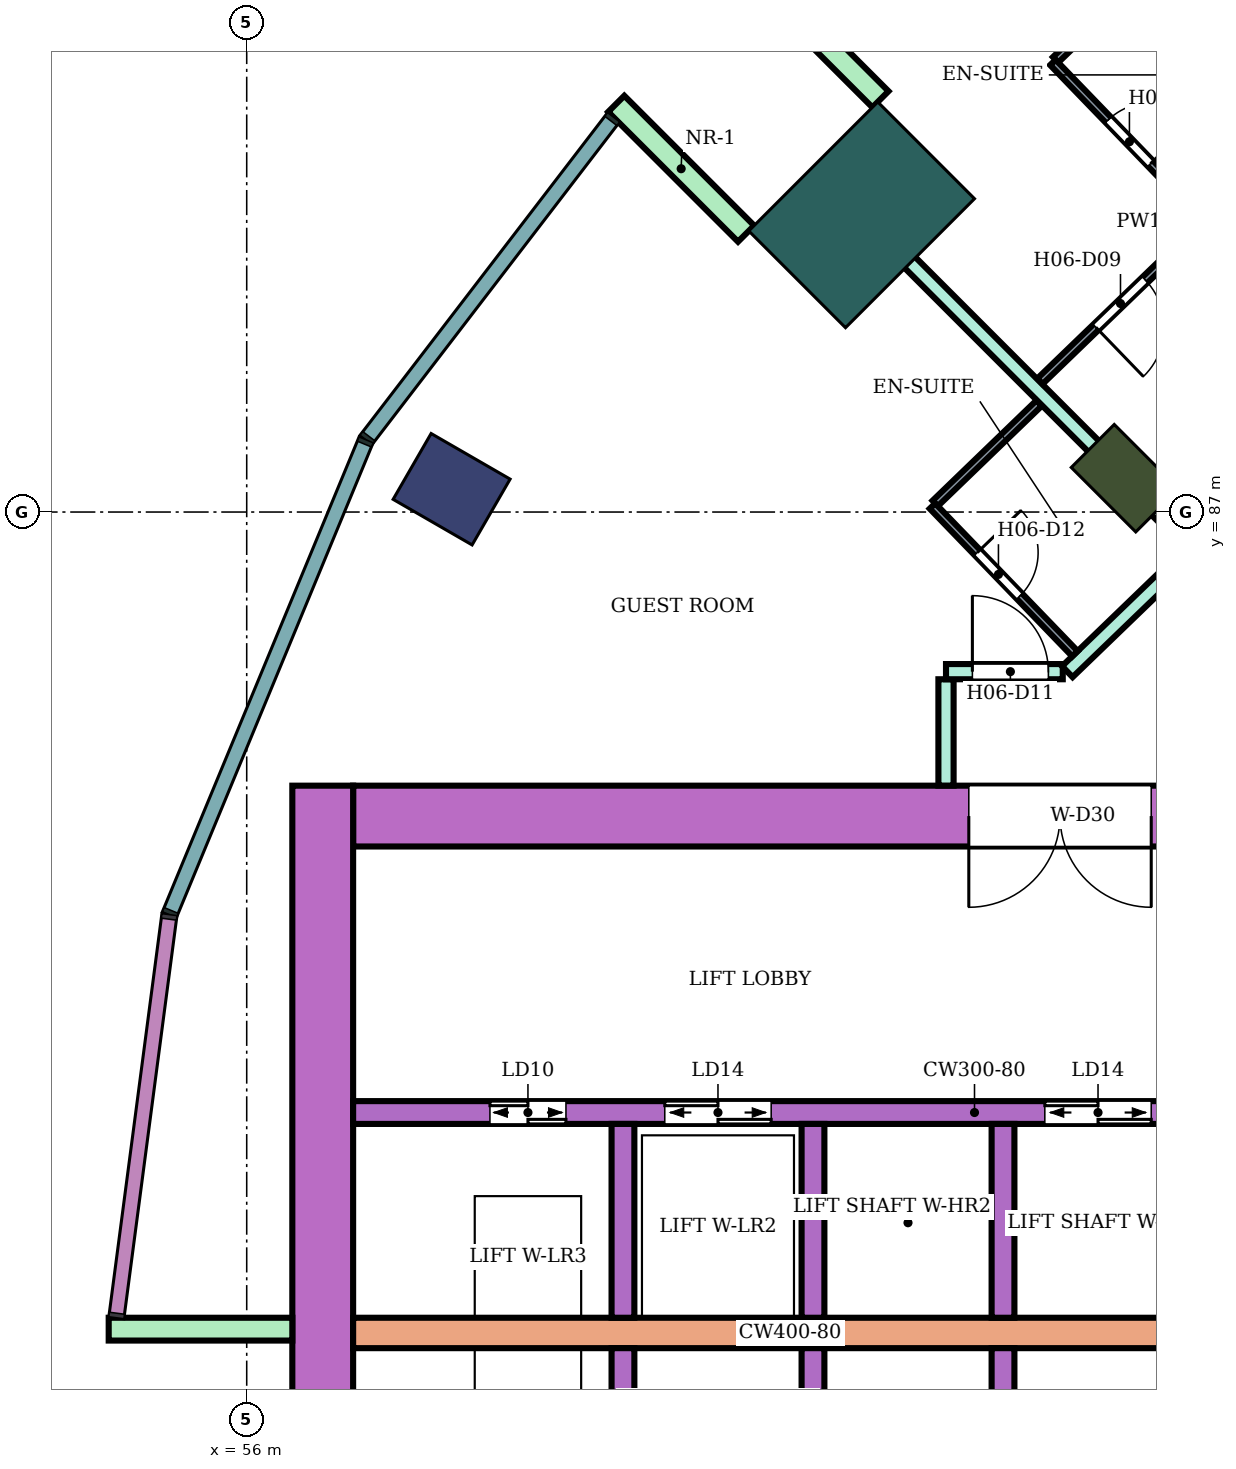
"""IFC4 building model, lengths in metres.
Left out: names, types, materials, properties, quantities, classifications, styles, units other than length and angle.
Written with IfcOpenShell. Run it as: python <this file> out.ifc"""

import sys

from ifc_helpers import new_model, si_unit, direction, frame, frame_2d, origin, origin_2d, place, context, subcontext, project, spatial, rectangle, extrude, element, fill, save


model = new_model("IFC4")
c1 = context("Model", 3, precision=1e-05, world=origin(), true_north=direction((0.0, 1.0)))
c2 = subcontext(c1, "Body", "Model", "MODEL_VIEW")
j1 = project(units=[si_unit("LENGTHUNIT", "METRE"), si_unit("PLANEANGLEUNIT", "RADIAN")], contexts=[c1])
p1 = place(None, origin())
s1 = spatial("IfcSite", under=j1, at=p1, CompositionType="ELEMENT")
p2 = place(p1, origin())
s2 = spatial("IfcBuilding", under=s1, at=p2, CompositionType="ELEMENT")
p3 = place(p2, frame((0.0, 0.0, 93.8)))
s3 = spatial("IfcBuildingStorey", under=s2, at=p3, CompositionType="ELEMENT", Elevation=93.8)
p4 = place(p3, frame((58.696, 87.3, 0.0), z_axis=(0.0, 0.0, 1.0), x_axis=(-0.866025403784, 0.5, 0.0)))
e1 = element("IfcColumn", 1, at=p4, inside=s3, PredefinedType="COLUMN", context=c2, shape_type="SweptSolid", body=[
    extrude(rectangle(XDim=1.2, YDim=1.0, at=origin_2d()), origin(), (0.0, 0.0, 1.0), 3.8),
])
p5 = place(p3, frame((67.555, 87.445, 0.0), z_axis=(0.0, 0.0, 1.0), x_axis=(-0.707106781187, 0.707106781187, 0.0)))
e2 = element("IfcColumn", 2, at=p5, inside=s3, PredefinedType="COLUMN", context=c2, shape_type="SweptSolid", body=[
    extrude(rectangle(XDim=1.2, YDim=0.8, at=origin_2d()), origin(), (0.0, 0.0, 1.0), 3.8),
])
p6 = place(p3, frame((64.09, 90.91, 0.0), z_axis=(0.0, 0.0, 1.0), x_axis=(-0.707106781187, 0.707106781187, 0.0)))
e3 = element("IfcColumn", 3, at=p6, inside=s3, PredefinedType="COLUMN", context=c2, shape_type="SweptSolid", body=[
    extrude(rectangle(XDim=1.8, YDim=2.4, at=origin_2d()), origin(), (0.0, 0.0, 1.0), 3.8),
])
p7 = place(p3, frame((72.1, 83.0, 0.0), z_axis=(0.0, 0.0, 1.0), x_axis=(-1.0, 0.0, 0.0)))
e4 = element("IfcWall", 4, at=p7, inside=s3, PredefinedType="SHEAR", context=c2, shape_type="SweptSolid", body=[
    extrude(rectangle(XDim=14.7, YDim=0.8, at=frame_2d((7.35, 0.0))), origin(), (0.0, 0.0, 1.0), 3.48),
])
p8 = place(p7, frame((4.2, 0.0, 0.0)))
e5 = element("IfcOpeningElement", 5, at=p8, cuts=e4, PredefinedType="OPENING", context=c2, shape_type="SweptSolid", body=[
    extrude(rectangle(XDim=2.4, YDim=2.4, at=frame_2d((1.2, 1.2))), frame((0.0, 0.41, 0.0), z_axis=(0.0, -1.0, 0.0), x_axis=(1.0, 0.0, 0.0)), (0.0, 0.0, 1.0), 0.82),
])
p9 = place(p3, frame((57.0, 83.4, 0.0), z_axis=(0.0, 0.0, 1.0), x_axis=(0.0, -1.0, 0.0)))
e6 = element("IfcWall", 6, at=p9, inside=s3, PredefinedType="SHEAR", context=c2, shape_type="SweptSolid", body=[
    extrude(rectangle(XDim=16.8, YDim=0.8, at=frame_2d((8.4, 0.0))), origin(), (0.0, 0.0, 1.0), 3.48),
])
p10 = place(p3, frame((68.3, 76.2, 0.0), z_axis=(0.0, 0.0, 1.0), x_axis=(-1.0, 0.0, 0.0)))
e7 = element("IfcWall", 7, at=p10, inside=s3, PredefinedType="SHEAR", context=c2, shape_type="SweptSolid", body=[
    extrude(rectangle(XDim=10.9, YDim=0.4, at=frame_2d((5.45, 0.0))), origin(), (0.0, 0.0, 1.0), 3.48),
])
p11 = place(p3, frame((68.3, 79.1, 0.0), z_axis=(0.0, 0.0, 1.0), x_axis=(-1.0, 0.0, 0.0)))
e8 = element("IfcWall", 8, at=p11, inside=s3, PredefinedType="SHEAR", context=c2, shape_type="SweptSolid", body=[
    extrude(rectangle(XDim=10.9, YDim=0.3, at=frame_2d((5.45, 0.0))), origin(), (0.0, 0.0, 1.0), 3.48),
])
p12 = place(p11, frame((0.4, 0.0, 0.0)))
e9 = element("IfcOpeningElement", 9, at=p12, cuts=e8, PredefinedType="OPENING", context=c2, shape_type="SweptSolid", body=[
    extrude(rectangle(XDim=1.4, YDim=2.1, at=frame_2d((0.7, 1.05))), frame((0.0, 0.16, 0.0), z_axis=(0.0, -1.0, 0.0), x_axis=(1.0, 0.0, 0.0)), (0.0, 0.0, 1.0), 0.32),
])
p13 = place(p11, frame((5.4, 0.0, 0.0)))
e10 = element("IfcOpeningElement", 10, at=p13, cuts=e8, PredefinedType="OPENING", context=c2, shape_type="SweptSolid", body=[
    extrude(rectangle(XDim=1.4, YDim=2.1, at=frame_2d((0.7, 1.05))), frame((0.0, 0.16, 0.0), z_axis=(0.0, -1.0, 0.0), x_axis=(1.0, 0.0, 0.0)), (0.0, 0.0, 1.0), 0.32),
])
p14 = place(p11, frame((8.1, 0.0, 0.0)))
e11 = element("IfcOpeningElement", 11, at=p14, cuts=e8, PredefinedType="OPENING", context=c2, shape_type="SweptSolid", body=[
    extrude(rectangle(XDim=1.0, YDim=2.1, at=frame_2d((0.5, 1.05))), frame((0.0, 0.16, 0.0), z_axis=(0.0, -1.0, 0.0), x_axis=(1.0, 0.0, 0.0)), (0.0, 0.0, 1.0), 0.32),
])
for number, where, z_axis, x_axis in (
    (12, (65.95, 76.0, 0.0), (0.0, 0.0, 1.0), (0.0, -1.0, 0.0)),
    (13, (63.45, 76.0, 0.0), (0.0, 0.0, 1.0), (0.0, -1.0, 0.0)),
    (14, (60.95, 76.0, 0.0), (0.0, 0.0, 1.0), (0.0, -1.0, 0.0)),
    (15, (65.95, 78.95, 0.0), (0.0, 0.0, 1.0), (0.0, -1.0, 0.0)),
    (16, (63.45, 78.95, 0.0), (0.0, 0.0, 1.0), (0.0, -1.0, 0.0)),
    (17, (60.95, 78.95, 0.0), (0.0, 0.0, 1.0), (0.0, -1.0, 0.0)),
):
    element("IfcWall", number, at=place(p3, frame(where, z_axis=z_axis, x_axis=x_axis)), inside=s3, PredefinedType="SHEAR", context=c2, shape_type="SweptSolid", body=[
        extrude(rectangle(XDim=2.55, YDim=0.3, at=frame_2d((1.275, 0.0))), origin(), (0.0, 0.0, 1.0), 3.48),
    ])
for number, where, z_axis, x_axis in (
    (18, (64.338, 92.43, 0.0), (0.0, 0.0, 1.0), (-0.707, 0.707, 0.0)),
    (19, (62.57, 90.662, 0.0), (0.0, 0.0, 1.0), (-0.707, 0.707, 0.0)),
    (20, (56.6, 76.25, 0.0), (0.0, 0.0, 1.0), (-1.0, 0.0, 0.0)),
):
    element("IfcWall", number, at=place(p3, frame(where, z_axis=z_axis, x_axis=x_axis)), inside=s3, PredefinedType="NOTDEFINED", context=c2, shape_type="SweptSolid", body=[
        extrude(rectangle(XDim=2.416, YDim=0.3, at=frame_2d((1.208, 0.0))), origin(), (0.0, 0.0, 1.0), 3.8),
    ])
p15 = place(p3, frame((63.6, 91.409, 0.0), z_axis=(0.0, 0.0, 1.0), x_axis=(0.706945318761, -0.707268206752, 0.0)))
e21 = element("IfcWall", 21, at=p15, inside=s3, PredefinedType="PARTITIONING", context=c2, shape_type="SweptSolid", body=[
    extrude(rectangle(XDim=6.805, YDim=0.2, at=frame_2d((3.402, 0.0))), origin(), (0.0, 0.0, 1.0), 3.35),
])
p16 = place(p3, frame((65.2, 83.401, 0.0), z_axis=(0.0, 0.0, 1.0), x_axis=(0.0, 1.0, 0.0)))
e22 = element("IfcWall", 22, at=p16, inside=s3, PredefinedType="PARTITIONING", context=c2, shape_type="SweptSolid", body=[
    extrude(rectangle(XDim=1.399, YDim=0.2, at=frame_2d((0.7, 0.0))), origin(), (0.0, 0.0, 1.0), 3.35),
])
p17 = place(p3, frame((65.2, 84.9, 0.0), z_axis=(0.0, 0.0, 1.0), x_axis=(1.0, 0.0, 0.0)))
e23 = element("IfcWall", 23, at=p17, inside=s3, PredefinedType="PARTITIONING", context=c2, shape_type="SweptSolid", body=[
    extrude(rectangle(XDim=1.536, YDim=0.2, at=frame_2d((0.768, 0.0))), origin(), (0.0, 0.0, 1.0), 3.35),
])
p18 = place(p17, frame((0.347, 0.0, 0.0)))
e24 = element("IfcOpeningElement", 24, at=p18, cuts=e23, PredefinedType="OPENING", context=c2, shape_type="SweptSolid", body=[
    extrude(rectangle(XDim=1.0, YDim=2.1, at=frame_2d((0.5, 1.05))), frame((0.0, 0.11, 0.0), z_axis=(0.0, -1.0, 0.0), x_axis=(1.0, 0.0, 0.0)), (0.0, 0.0, 1.0), 0.22),
])
p19 = place(p3, frame((66.796, 84.9, 0.0), z_axis=(0.0, 0.0, 1.0), x_axis=(0.719690784855, 0.694294731505, 0.0)))
e25 = element("IfcWall", 25, at=p19, inside=s3, PredefinedType="PARTITIONING", context=c2, shape_type="SweptSolid", body=[
    extrude(rectangle(XDim=6.585, YDim=0.2, at=frame_2d((3.292, 0.0))), origin(), (0.0, 0.0, 1.0), 3.35),
])
p20 = place(p19, frame((4.006, 0.0, 0.0)))
e26 = element("IfcOpeningElement", 26, at=p20, cuts=e25, PredefinedType="OPENING", context=c2, shape_type="SweptSolid", body=[
    extrude(rectangle(XDim=1.0, YDim=2.1, at=frame_2d((0.5, 1.05))), frame((0.0, 0.11, 0.0), z_axis=(0.0, -1.0, 0.0), x_axis=(1.0, 0.0, 0.0)), (0.0, 0.0, 1.0), 0.22),
])
p21 = place(p3, frame((67.102, 97.342, 0.0), z_axis=(0.0, 0.0, 1.0), x_axis=(0.499900389553, -0.866082906265, 0.0)))
e27 = element("IfcWall", 27, at=p21, inside=s3, PredefinedType="PARTITIONING", context=c2, shape_type="SweptSolid", body=[
    extrude(rectangle(XDim=8.908, YDim=0.2, at=frame_2d((4.454, 0.0))), origin(), (0.0, 0.0, 1.0), 3.35),
])
p22 = place(p3, frame((65.058, 87.114, 0.0), z_axis=(0.0, 0.0, 1.0), x_axis=(0.719653890619, 0.694332973232, 0.0)))
e28 = element("IfcWall", 28, at=p22, inside=s3, PredefinedType="PARTITIONING", context=c2, shape_type="SweptSolid", body=[
    extrude(rectangle(XDim=1.899, YDim=0.1, at=frame_2d((0.95, 0.0))), origin(), (0.0, 0.0, 1.0), 3.35),
])
p23 = place(p3, frame((65.022, 87.079, 0.0), z_axis=(0.0, 0.0, 1.0), x_axis=(0.694287838235, -0.719697434815, 0.0)))
e29 = element("IfcWall", 29, at=p23, inside=s3, PredefinedType="PARTITIONING", context=c2, shape_type="SweptSolid", body=[
    extrude(rectangle(XDim=2.7, YDim=0.1, at=frame_2d((1.35, 0.0))), origin(), (0.0, 0.0, 1.0), 3.35),
])
p24 = place(p23, frame((0.85, 0.0, 0.0)))
e30 = element("IfcOpeningElement", 30, at=p24, cuts=e29, PredefinedType="OPENING", context=c2, shape_type="SweptSolid", body=[
    extrude(rectangle(XDim=0.8, YDim=2.1, at=frame_2d((0.4, 1.05))), frame((0.0, 0.06, 0.0), z_axis=(0.0, -1.0, 0.0), x_axis=(1.0, 0.0, 0.0)), (0.0, 0.0, 1.0), 0.12),
])
p25 = place(p3, frame((66.436, 88.72, 0.0), z_axis=(0.0, 0.0, 1.0), x_axis=(0.719585934284, 0.694403400899, 0.0)))
e31 = element("IfcWall", 31, at=p25, inside=s3, PredefinedType="PARTITIONING", context=c2, shape_type="SweptSolid", body=[
    extrude(rectangle(XDim=4.925, YDim=0.1, at=frame_2d((2.462, 0.0))), origin(), (0.0, 0.0, 1.0), 3.35),
])
p26 = place(p25, frame((1.022, 0.0, 0.0)))
e32 = element("IfcOpeningElement", 32, at=p26, cuts=e31, PredefinedType="OPENING", context=c2, shape_type="SweptSolid", body=[
    extrude(rectangle(XDim=0.9, YDim=2.1, at=frame_2d((0.45, 1.05))), frame((0.0, 0.06, 0.0), z_axis=(0.0, -1.0, 0.0), x_axis=(1.0, 0.0, 0.0)), (0.0, 0.0, 1.0), 0.12),
])
p27 = place(p3, frame((66.642, 92.95, 0.0), z_axis=(0.0, 0.0, 1.0), x_axis=(0.719667412702, 0.694318957753, 0.0)))
e33 = element("IfcWall", 33, at=p27, inside=s3, PredefinedType="PARTITIONING", context=c2, shape_type="SweptSolid", body=[
    extrude(rectangle(XDim=2.562, YDim=0.1, at=frame_2d((1.281, 0.0))), origin(), (0.0, 0.0, 1.0), 3.35),
])
p28 = place(p3, frame((66.606, 92.915, 0.0), z_axis=(0.0, 0.0, 1.0), x_axis=(0.694403413121, -0.71958592249, 0.0)))
e34 = element("IfcWall", 34, at=p28, inside=s3, PredefinedType="PARTITIONING", context=c2, shape_type="SweptSolid", body=[
    extrude(rectangle(XDim=2.85, YDim=0.1, at=frame_2d((1.425, 0.0))), origin(), (0.0, 0.0, 1.0), 3.35),
])
p29 = place(p28, frame((1.05, 0.0, 0.0)))
e35 = element("IfcOpeningElement", 35, at=p29, cuts=e34, PredefinedType="OPENING", context=c2, shape_type="SweptSolid", body=[
    extrude(rectangle(XDim=0.8, YDim=2.1, at=frame_2d((0.4, 1.05))), frame((0.0, 0.06, 0.0), z_axis=(0.0, -1.0, 0.0), x_axis=(1.0, 0.0, 0.0)), (0.0, 0.0, 1.0), 0.12),
])
p30 = place(p26, frame((0.9, 0.0, 0.0), z_axis=(0.0, 0.0, 1.0), x_axis=(-1.0, 0.0, 0.0)))
e36 = element("IfcDoor", 36, at=p30, inside=s3, OperationType="SINGLE_SWING_RIGHT", PredefinedType="DOOR", context=c2, shape_type="SweptSolid", body=[
    extrude(rectangle(XDim=0.9, YDim=2.1, at=frame_2d((0.45, 1.05))), frame((0.0, 0.025, 0.0), z_axis=(0.0, -1.0, 0.0), x_axis=(1.0, 0.0, 0.0)), (0.0, 0.0, 1.0), 0.05),
])
fill(e32, e36)
p31 = place(p29, origin())
e37 = element("IfcDoor", 37, at=p31, inside=s3, OperationType="SINGLE_SWING_RIGHT", PredefinedType="DOOR", context=c2, shape_type="SweptSolid", body=[
    extrude(rectangle(XDim=0.8, YDim=2.1, at=frame_2d((0.4, 1.05))), frame((0.0, 0.025, 0.0), z_axis=(0.0, -1.0, 0.0), x_axis=(1.0, 0.0, 0.0)), (0.0, 0.0, 1.0), 0.05),
])
fill(e35, e37)
p32 = place(p18, origin())
e38 = element("IfcDoor", 38, at=p32, inside=s3, OperationType="SINGLE_SWING_LEFT", PredefinedType="DOOR", context=c2, shape_type="SweptSolid", body=[
    extrude(rectangle(XDim=1.0, YDim=2.1, at=frame_2d((0.5, 1.05))), frame((0.0, 0.025, 0.0), z_axis=(0.0, -1.0, 0.0), x_axis=(1.0, 0.0, 0.0)), (0.0, 0.0, 1.0), 0.05),
])
fill(e24, e38)
p33 = place(p24, origin())
e39 = element("IfcDoor", 39, at=p33, inside=s3, OperationType="SINGLE_SWING_LEFT", PredefinedType="DOOR", context=c2, shape_type="SweptSolid", body=[
    extrude(rectangle(XDim=0.8, YDim=2.1, at=frame_2d((0.4, 1.05))), frame((0.0, 0.025, 0.0), z_axis=(0.0, -1.0, 0.0), x_axis=(1.0, 0.0, 0.0)), (0.0, 0.0, 1.0), 0.05),
])
fill(e30, e39)
p34 = place(p12, origin())
e40 = element("IfcDoor", 40, at=p34, inside=s3, OperationType="DOUBLE_DOOR_SLIDING", PredefinedType="DOOR", context=c2, shape_type="SweptSolid", body=[
    extrude(rectangle(XDim=1.4, YDim=2.1, at=frame_2d((0.7, 1.05))), frame((0.0, 0.025, 0.0), z_axis=(0.0, -1.0, 0.0), x_axis=(1.0, 0.0, 0.0)), (0.0, 0.0, 1.0), 0.05),
])
fill(e9, e40)
p35 = place(p13, origin())
e41 = element("IfcDoor", 41, at=p35, inside=s3, OperationType="DOUBLE_DOOR_SLIDING", PredefinedType="DOOR", context=c2, shape_type="SweptSolid", body=[
    extrude(rectangle(XDim=1.4, YDim=2.1, at=frame_2d((0.7, 1.05))), frame((0.0, 0.025, 0.0), z_axis=(0.0, -1.0, 0.0), x_axis=(1.0, 0.0, 0.0)), (0.0, 0.0, 1.0), 0.05),
])
fill(e10, e41)
p36 = place(p14, origin())
e42 = element("IfcDoor", 42, at=p36, inside=s3, OperationType="DOUBLE_DOOR_SLIDING", PredefinedType="DOOR", context=c2, shape_type="SweptSolid", body=[
    extrude(rectangle(XDim=1.0, YDim=2.1, at=frame_2d((0.5, 1.05))), frame((0.0, 0.025, 0.0), z_axis=(0.0, -1.0, 0.0), x_axis=(1.0, 0.0, 0.0)), (0.0, 0.0, 1.0), 0.05),
])
fill(e11, e42)
p37 = place(p8, origin())
e43 = element("IfcDoor", 43, at=p37, inside=s3, OperationType="DOUBLE_DOOR_SINGLE_SWING", PredefinedType="DOOR", context=c2, shape_type="SweptSolid", body=[
    extrude(rectangle(XDim=2.4, YDim=2.4, at=frame_2d((1.2, 1.2))), frame((0.0, 0.025, 0.0), z_axis=(0.0, -1.0, 0.0), x_axis=(1.0, 0.0, 0.0)), (0.0, 0.0, 1.0), 0.05),
])
fill(e5, e43)
save(model, sys.argv[1])
